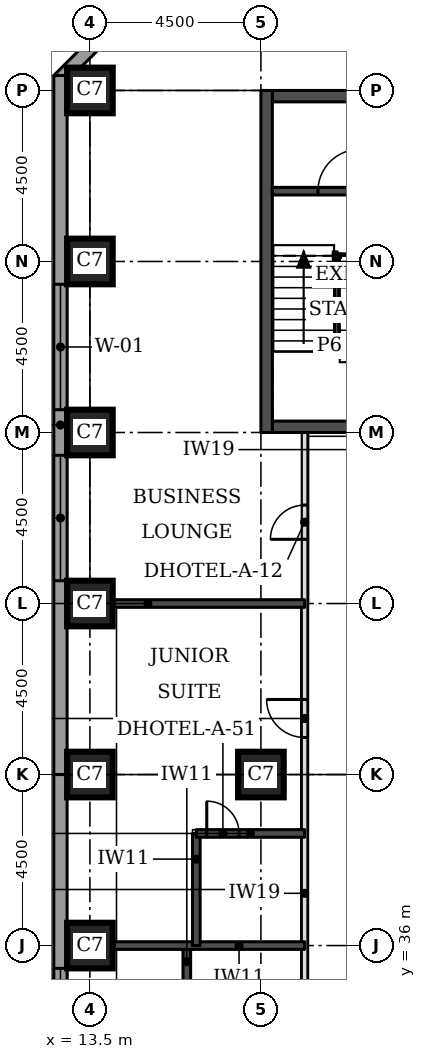
"""IFC4 building model, lengths in metres.
Left out: names, types, materials, properties, quantities, classifications, styles, units other than length and angle.
Written with IfcOpenShell. Run it as: python <this file> out.ifc"""

import sys

from ifc_helpers import new_model, si_unit, direction, frame, frame_2d, origin, origin_2d, place, context, subcontext, project, spatial, rectangle, extrude, element, fill, save


model = new_model("IFC4")
c1 = context("Model", 3, precision=1e-05, world=origin(), true_north=direction((0.0, 1.0)))
c2 = subcontext(c1, "Body", "Model", "MODEL_VIEW")
j1 = project(units=[si_unit("LENGTHUNIT", "METRE"), si_unit("PLANEANGLEUNIT", "RADIAN")], contexts=[c1])
p1 = place(None, origin())
s1 = spatial("IfcSite", under=j1, at=p1, CompositionType="ELEMENT")
p2 = place(p1, origin())
s2 = spatial("IfcBuilding", under=s1, at=p2, CompositionType="ELEMENT")
p3 = place(p2, frame((0.0, 0.0, 26.4)))
s3 = spatial("IfcBuildingStorey", under=s2, at=p3, CompositionType="ELEMENT", Elevation=26.4)
for number, where, z_axis, x_axis in (
    (1, (13.5, 36.0, 0.0), (0.0, 0.0, 1.0), (1.0, 0.0, 0.0)),
    (2, (13.5, 40.5, 0.0), (0.0, 0.0, 1.0), (1.0, 0.0, 0.0)),
    (3, (18.0, 40.5, 0.0), (0.0, 0.0, 1.0), (1.0, 0.0, 0.0)),
    (4, (13.5, 45.0, 0.0), (0.0, 0.0, 1.0), (1.0, 0.0, 0.0)),
    (5, (13.5, 49.5, 0.0), (0.0, 0.0, 1.0), (1.0, 0.0, 0.0)),
    (6, (13.5, 54.0, 0.0), (0.0, 0.0, 1.0), (1.0, 0.0, 0.0)),
    (7, (13.5, 58.5, 0.0), (0.0, 0.0, 1.0), (1.0, 0.0, 0.0)),
):
    element("IfcColumn", number, at=place(p3, frame(where, z_axis=z_axis, x_axis=x_axis)), inside=s3, PredefinedType="COLUMN", context=c2, shape_type="SweptSolid", body=[
        extrude(rectangle(XDim=1.2, YDim=1.2, at=origin_2d()), origin(), (0.0, 0.0, 1.0), 3.3),
    ])
p4 = place(p3, frame((18.3, 49.65, 0.0), z_axis=(0.0, 0.0, 1.0), x_axis=(1.0, 0.0, 0.0)))
e8 = element("IfcWall", 8, at=p4, inside=s3, PredefinedType="SHEAR", context=c2, shape_type="SweptSolid", body=[
    extrude(rectangle(XDim=8.4, YDim=0.3, at=frame_2d((4.2, 0.0))), origin(), (0.0, 0.0, 1.0), 3.3),
])
p5 = place(p3, frame((18.3, 58.35, 0.0), z_axis=(0.0, 0.0, 1.0), x_axis=(1.0, 0.0, 0.0)))
e9 = element("IfcWall", 9, at=p5, inside=s3, PredefinedType="SHEAR", context=c2, shape_type="SweptSolid", body=[
    extrude(rectangle(XDim=8.4, YDim=0.3, at=frame_2d((4.2, 0.0))), origin(), (0.0, 0.0, 1.0), 3.3),
])
p6 = place(p5, frame((3.3, 0.0, 0.0)))
e10 = element("IfcOpeningElement", 10, at=p6, cuts=e9, PredefinedType="OPENING", context=c2, shape_type="SweptSolid", body=[
    extrude(rectangle(XDim=1.8, YDim=2.1, at=frame_2d((0.9, 1.05))), frame((0.0, 0.16, 0.0), z_axis=(0.0, -1.0, 0.0), x_axis=(1.0, 0.0, 0.0)), (0.0, 0.0, 1.0), 0.32),
])
p7 = place(p3, frame((18.15, 49.5, 0.0), z_axis=(0.0, 0.0, 1.0), x_axis=(0.0, 1.0, 0.0)))
e11 = element("IfcWall", 11, at=p7, inside=s3, PredefinedType="SHEAR", context=c2, shape_type="SweptSolid", body=[
    extrude(rectangle(XDim=9.0, YDim=0.3, at=frame_2d((4.5, 0.0))), origin(), (0.0, 0.0, 1.0), 3.3),
])
p8 = place(p3, frame((17.73, 63.826, 0.0), z_axis=(0.0, 0.0, 1.0), x_axis=(-0.707106781187, -0.707106781187, 0.0)))
e12 = element("IfcWall", 12, at=p8, inside=s3, PredefinedType="STANDARD", context=c2, shape_type="SweptSolid", body=[
    extrude(rectangle(XDim=7.151, YDim=0.35, at=frame_2d((3.576, 0.0))), origin(), (0.0, 0.0, 1.0), 3.055),
])
p9 = place(p8, frame((1.926, 0.0, 0.8)))
e13 = element("IfcOpeningElement", 13, at=p9, cuts=e12, PredefinedType="OPENING", context=c2, shape_type="SweptSolid", body=[
    extrude(rectangle(XDim=3.3, YDim=1.5, at=frame_2d((1.65, 0.75))), frame((0.0, 0.185, 0.0), z_axis=(0.0, -1.0, 0.0), x_axis=(1.0, 0.0, 0.0)), (0.0, 0.0, 1.0), 0.37),
])
p10 = place(p3, frame((12.725, 58.894, 0.0), z_axis=(0.0, 0.0, 1.0), x_axis=(0.0, -1.0, 0.0)))
e14 = element("IfcWall", 14, at=p10, inside=s3, PredefinedType="STANDARD", context=c2, shape_type="SweptSolid", body=[
    extrude(rectangle(XDim=18.394, YDim=0.35, at=frame_2d((9.197, 0.0))), origin(), (0.0, 0.0, 1.0), 3.055),
])
p11 = place(p10, frame((5.493, 0.0, 0.8)))
e15 = element("IfcOpeningElement", 15, at=p11, cuts=e14, PredefinedType="OPENING", context=c2, shape_type="SweptSolid", body=[
    extrude(rectangle(XDim=3.3, YDim=1.5, at=frame_2d((1.65, 0.75))), frame((0.0, 0.185, 0.0), z_axis=(0.0, -1.0, 0.0), x_axis=(1.0, 0.0, 0.0)), (0.0, 0.0, 1.0), 0.37),
])
p12 = place(p10, frame((9.993, 0.0, 0.8)))
e16 = element("IfcOpeningElement", 16, at=p12, cuts=e14, PredefinedType="OPENING", context=c2, shape_type="SweptSolid", body=[
    extrude(rectangle(XDim=3.3, YDim=1.5, at=frame_2d((1.65, 0.75))), frame((0.0, 0.185, 0.0), z_axis=(0.0, -1.0, 0.0), x_axis=(1.0, 0.0, 0.0)), (0.0, 0.0, 1.0), 0.37),
])
p13 = place(p3, frame((12.725, 40.5, 0.0), z_axis=(0.0, 0.0, 1.0), x_axis=(0.0, -1.0, 0.0)))
e17 = element("IfcWall", 17, at=p13, inside=s3, PredefinedType="STANDARD", context=c2, shape_type="SweptSolid", body=[
    extrude(rectangle(XDim=18.394, YDim=0.35, at=frame_2d((9.197, 0.0))), origin(), (0.0, 0.0, 1.0), 3.055),
])
p14 = place(p13, frame((5.1, 0.0, 0.8)))
e18 = element("IfcOpeningElement", 18, at=p14, cuts=e17, PredefinedType="OPENING", context=c2, shape_type="SweptSolid", body=[
    extrude(rectangle(XDim=3.3, YDim=1.5, at=frame_2d((1.65, 0.75))), frame((0.0, 0.185, 0.0), z_axis=(0.0, -1.0, 0.0), x_axis=(1.0, 0.0, 0.0)), (0.0, 0.0, 1.0), 0.37),
])
p15 = place(p13, frame((9.6, 0.0, 0.8)))
e19 = element("IfcOpeningElement", 19, at=p15, cuts=e17, PredefinedType="OPENING", context=c2, shape_type="SweptSolid", body=[
    extrude(rectangle(XDim=3.3, YDim=1.5, at=frame_2d((1.65, 0.75))), frame((0.0, 0.185, 0.0), z_axis=(0.0, -1.0, 0.0), x_axis=(1.0, 0.0, 0.0)), (0.0, 0.0, 1.0), 0.37),
])
p16 = place(p3, frame((19.15, 23.65, 0.0), z_axis=(0.0, 0.0, 1.0), x_axis=(0.0, 1.0, 0.0)))
e20 = element("IfcWall", 20, at=p16, inside=s3, PredefinedType="PARTITIONING", context=c2, shape_type="SweptSolid", body=[
    extrude(rectangle(XDim=25.85, YDim=0.15, at=frame_2d((12.925, 0.0))), origin(), (0.0, 0.0, 1.0), 3.08),
])
p17 = place(p16, frame((1.775, 0.0, 0.0)))
e21 = element("IfcOpeningElement", 21, at=p17, cuts=e20, PredefinedType="OPENING", context=c2, shape_type="SweptSolid", body=[
    extrude(rectangle(XDim=1.0, YDim=2.1, at=frame_2d((0.5, 1.05))), frame((0.0, 0.085, 0.0), z_axis=(0.0, -1.0, 0.0), x_axis=(1.0, 0.0, 0.0)), (0.0, 0.0, 1.0), 0.17),
])
p18 = place(p16, frame((6.125, 0.0, 0.0)))
e22 = element("IfcOpeningElement", 22, at=p18, cuts=e20, PredefinedType="OPENING", context=c2, shape_type="SweptSolid", body=[
    extrude(rectangle(XDim=1.0, YDim=2.1, at=frame_2d((0.5, 1.05))), frame((0.0, 0.085, 0.0), z_axis=(0.0, -1.0, 0.0), x_axis=(1.0, 0.0, 0.0)), (0.0, 0.0, 1.0), 0.17),
])
p19 = place(p16, frame((17.825, 0.0, 0.0)))
e23 = element("IfcOpeningElement", 23, at=p19, cuts=e20, PredefinedType="OPENING", context=c2, shape_type="SweptSolid", body=[
    extrude(rectangle(XDim=1.0, YDim=2.1, at=frame_2d((0.5, 1.05))), frame((0.0, 0.085, 0.0), z_axis=(0.0, -1.0, 0.0), x_axis=(1.0, 0.0, 0.0)), (0.0, 0.0, 1.0), 0.17),
])
p20 = place(p16, frame((23.04, 0.0, 0.0)))
e24 = element("IfcOpeningElement", 24, at=p20, cuts=e20, PredefinedType="OPENING", context=c2, shape_type="SweptSolid", body=[
    extrude(rectangle(XDim=0.9, YDim=2.1, at=frame_2d((0.45, 1.05))), frame((0.0, 0.085, 0.0), z_axis=(0.0, -1.0, 0.0), x_axis=(1.0, 0.0, 0.0)), (0.0, 0.0, 1.0), 0.17),
])
p21 = place(p3, frame((16.05, 33.55, 0.0), z_axis=(0.0, 0.0, 1.0), x_axis=(0.0, 1.0, 0.0)))
e25 = element("IfcWall", 25, at=p21, inside=s3, PredefinedType="SOLIDWALL", context=c2, shape_type="SweptSolid", body=[
    extrude(rectangle(XDim=2.45, YDim=0.2, at=frame_2d((1.225, 0.0))), origin(), (0.0, 0.0, 1.0), 3.08),
])
p22 = place(p3, frame((14.1, 36.0, 0.0), z_axis=(0.0, 0.0, 1.0), x_axis=(1.0, 0.0, 0.0)))
e26 = element("IfcWall", 26, at=p22, inside=s3, PredefinedType="SOLIDWALL", context=c2, shape_type="SweptSolid", body=[
    extrude(rectangle(XDim=5.05, YDim=0.2, at=frame_2d((2.525, 0.0))), origin(), (0.0, 0.0, 1.0), 3.08),
])
p23 = place(p3, frame((16.3, 36.0, 0.0), z_axis=(0.0, 0.0, 1.0), x_axis=(0.0, 1.0, 0.0)))
e27 = element("IfcWall", 27, at=p23, inside=s3, PredefinedType="SOLIDWALL", context=c2, shape_type="SweptSolid", body=[
    extrude(rectangle(XDim=2.95, YDim=0.2, at=frame_2d((1.475, 0.0))), origin(), (0.0, 0.0, 1.0), 3.08),
])
p24 = place(p3, frame((16.3, 38.95, 0.0), z_axis=(0.0, 0.0, 1.0), x_axis=(1.0, 0.0, 0.0)))
e28 = element("IfcWall", 28, at=p24, inside=s3, PredefinedType="SOLIDWALL", context=c2, shape_type="SweptSolid", body=[
    extrude(rectangle(XDim=2.85, YDim=0.2, at=frame_2d((1.425, 0.0))), origin(), (0.0, 0.0, 1.0), 3.08),
])
p25 = place(p24, frame((0.275, 0.0, 0.0)))
e29 = element("IfcOpeningElement", 29, at=p25, cuts=e28, PredefinedType="OPENING", context=c2, shape_type="SweptSolid", body=[
    extrude(rectangle(XDim=0.85, YDim=2.1, at=frame_2d((0.425, 1.05))), frame((0.0, 0.11, 0.0), z_axis=(0.0, -1.0, 0.0), x_axis=(1.0, 0.0, 0.0)), (0.0, 0.0, 1.0), 0.22),
])
p26 = place(p3, frame((14.1, 45.0, 0.0), z_axis=(0.0, 0.0, 1.0), x_axis=(1.0, 0.0, 0.0)))
e30 = element("IfcWall", 30, at=p26, inside=s3, PredefinedType="SOLIDWALL", context=c2, shape_type="SweptSolid", body=[
    extrude(rectangle(XDim=5.05, YDim=0.2, at=frame_2d((2.525, 0.0))), origin(), (0.0, 0.0, 1.0), 3.08),
])
p27 = place(p3, frame((18.3, 55.85, 0.0), z_axis=(0.0, 0.0, 1.0), x_axis=(1.0, 0.0, 0.0)))
e31 = element("IfcWall", 31, at=p27, inside=s3, PredefinedType="SOLIDWALL", context=c2, shape_type="SweptSolid", body=[
    extrude(rectangle(XDim=3.5, YDim=0.2, at=frame_2d((1.75, 0.0))), origin(), (0.0, 0.0, 1.0), 3.08),
])
p28 = place(p27, frame((1.2, 0.0, 0.0)))
e32 = element("IfcOpeningElement", 32, at=p28, cuts=e31, PredefinedType="OPENING", context=c2, shape_type="SweptSolid", body=[
    extrude(rectangle(XDim=1.1, YDim=2.1, at=frame_2d((0.55, 1.05))), frame((0.0, 0.11, 0.0), z_axis=(0.0, -1.0, 0.0), x_axis=(1.0, 0.0, 0.0)), (0.0, 0.0, 1.0), 0.22),
])
p29 = place(p11, origin())
e33 = element("IfcWindow", 33, at=p29, inside=s3, PartitioningType="SINGLE_PANEL", PredefinedType="WINDOW", context=c2, shape_type="SweptSolid", body=[
    extrude(rectangle(XDim=3.3, YDim=1.5, at=frame_2d((1.65, 0.75))), frame((0.0, 0.085, 0.0), z_axis=(0.0, -1.0, 0.0), x_axis=(1.0, 0.0, 0.0)), (0.0, 0.0, 1.0), 0.06),
])
fill(e15, e33)
p30 = place(p12, origin())
e34 = element("IfcWindow", 34, at=p30, inside=s3, PartitioningType="SINGLE_PANEL", PredefinedType="WINDOW", context=c2, shape_type="SweptSolid", body=[
    extrude(rectangle(XDim=3.3, YDim=1.5, at=frame_2d((1.65, 0.75))), frame((0.0, 0.085, 0.0), z_axis=(0.0, -1.0, 0.0), x_axis=(1.0, 0.0, 0.0)), (0.0, 0.0, 1.0), 0.06),
])
fill(e16, e34)
p31 = place(p14, origin())
e35 = element("IfcWindow", 35, at=p31, inside=s3, PartitioningType="SINGLE_PANEL", PredefinedType="WINDOW", context=c2, shape_type="SweptSolid", body=[
    extrude(rectangle(XDim=3.3, YDim=1.5, at=frame_2d((1.65, 0.75))), frame((0.0, 0.085, 0.0), z_axis=(0.0, -1.0, 0.0), x_axis=(1.0, 0.0, 0.0)), (0.0, 0.0, 1.0), 0.06),
])
fill(e18, e35)
p32 = place(p19, origin())
e36 = element("IfcDoor", 36, at=p32, inside=s3, OperationType="SINGLE_SWING_RIGHT", PredefinedType="DOOR", context=c2, shape_type="SweptSolid", body=[
    extrude(rectangle(XDim=1.0, YDim=2.1, at=frame_2d((0.5, 1.05))), frame((0.0, 0.025, 0.0), z_axis=(0.0, -1.0, 0.0), x_axis=(1.0, 0.0, 0.0)), (0.0, 0.0, 1.0), 0.05),
])
fill(e23, e36)
p33 = place(p25, origin())
e37 = element("IfcDoor", 37, at=p33, inside=s3, OperationType="SINGLE_SWING_LEFT", PredefinedType="DOOR", context=c2, shape_type="SweptSolid", body=[
    extrude(rectangle(XDim=0.85, YDim=2.1, at=frame_2d((0.425, 1.05))), frame((0.0, 0.025, 0.0), z_axis=(0.0, -1.0, 0.0), x_axis=(1.0, 0.0, 0.0)), (0.0, 0.0, 1.0), 0.05),
])
fill(e29, e37)
p34 = place(p20, origin())
e38 = element("IfcDoor", 38, at=p34, inside=s3, OperationType="SINGLE_SWING_LEFT", PredefinedType="DOOR", context=c2, shape_type="SweptSolid", body=[
    extrude(rectangle(XDim=0.9, YDim=2.1, at=frame_2d((0.45, 1.05))), frame((0.0, 0.025, 0.0), z_axis=(0.0, -1.0, 0.0), x_axis=(1.0, 0.0, 0.0)), (0.0, 0.0, 1.0), 0.05),
])
fill(e24, e38)
p35 = place(p28, origin())
e39 = element("IfcDoor", 39, at=p35, inside=s3, OperationType="SINGLE_SWING_RIGHT", PredefinedType="DOOR", context=c2, shape_type="SweptSolid", body=[
    extrude(rectangle(XDim=1.1, YDim=2.1, at=frame_2d((0.55, 1.05))), frame((0.0, 0.025, 0.0), z_axis=(0.0, -1.0, 0.0), x_axis=(1.0, 0.0, 0.0)), (0.0, 0.0, 1.0), 0.05),
])
fill(e32, e39)
save(model, sys.argv[1])
